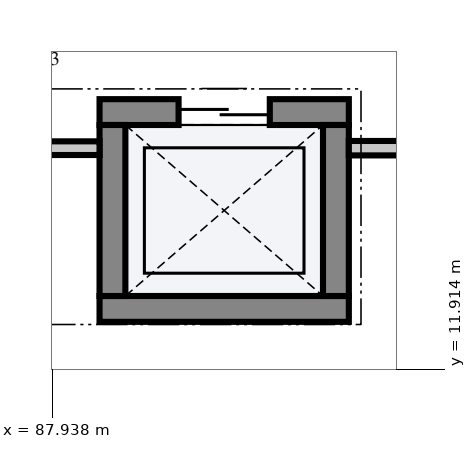
"""IFC4 building model, lengths in metres.
Left out: names, types, materials, properties, quantities, classifications, styles, units other than length and angle.
Written with IfcOpenShell. Run it as: python <this file> out.ifc"""

import sys

from ifc_helpers import new_model, si_unit, direction, frame, frame_2d, origin, place, context, subcontext, project, spatial, rectangle, extrude, element, fill, save


model = new_model("IFC4")
c1 = context("Model", 3, precision=1e-05, world=origin(), true_north=direction((0.0, 1.0)))
c2 = subcontext(c1, "Body", "Model", "MODEL_VIEW")
j1 = project(units=[si_unit("LENGTHUNIT", "METRE"), si_unit("PLANEANGLEUNIT", "RADIAN")], contexts=[c1])
p1 = place(None, origin())
s1 = spatial("IfcSite", under=j1, at=p1, CompositionType="ELEMENT")
p2 = place(p1, origin())
s2 = spatial("IfcBuilding", under=s1, at=p2, CompositionType="ELEMENT")
p3 = place(p2, frame((0.0, 0.0, 15.0)))
s3 = spatial("IfcBuildingStorey", under=s2, at=p3, CompositionType="ELEMENT", Elevation=15.0)
p4 = place(p3, frame((88.56, 12.705, 0.0), z_axis=(0.0, 0.0, 1.0), x_axis=(1.0, 0.0, 0.0)))
e1 = element("IfcWall", 1, at=p4, inside=s3, PredefinedType="SHEAR", context=c2, shape_type="SweptSolid", body=[
    extrude(rectangle(XDim=3.28, YDim=0.34, at=frame_2d((1.64, 0.0))), origin(), (0.0, 0.0, 1.0), 4.52),
])
p5 = place(p3, frame((88.56, 15.295, 0.0), z_axis=(0.0, 0.0, 1.0), x_axis=(1.0, 0.0, 0.0)))
e2 = element("IfcWall", 2, at=p5, inside=s3, PredefinedType="SHEAR", context=c2, shape_type="SweptSolid", body=[
    extrude(rectangle(XDim=3.28, YDim=0.34, at=frame_2d((1.64, 0.0))), origin(), (0.0, 0.0, 1.0), 4.52),
])
p6 = place(p5, frame((1.04, 0.0, 0.0)))
e3 = element("IfcOpeningElement", 3, at=p6, cuts=e2, PredefinedType="OPENING", context=c2, shape_type="SweptSolid", body=[
    extrude(rectangle(XDim=1.2, YDim=2.2, at=frame_2d((0.6, 1.1))), frame((0.0, 0.182, 0.0), z_axis=(0.0, -1.0, 0.0), x_axis=(1.0, 0.0, 0.0)), (0.0, 0.0, 1.0), 0.364),
])
for number, where, z_axis, x_axis in (
    (4, (88.73, 12.875, 0.0), (0.0, 0.0, 1.0), (0.0, 1.0, 0.0)),
    (5, (91.67, 12.875, 0.0), (0.0, 0.0, 1.0), (0.0, 1.0, 0.0)),
):
    element("IfcWall", number, at=place(p3, frame(where, z_axis=z_axis, x_axis=x_axis)), inside=s3, PredefinedType="SHEAR", context=c2, shape_type="SweptSolid", body=[
        extrude(rectangle(XDim=2.25, YDim=0.34, at=frame_2d((1.125, 0.0))), origin(), (0.0, 0.0, 1.0), 4.52),
    ])
p7 = place(p3, frame((91.84, 14.82, 0.0), z_axis=(0.0, 0.0, 1.0), x_axis=(1.0, 0.0, 0.0)))
e6 = element("IfcWall", 6, at=p7, inside=s3, PredefinedType="PARTITIONING", context=c2, shape_type="SweptSolid", body=[
    extrude(rectangle(XDim=24.04, YDim=0.19, at=frame_2d((12.02, 0.0))), origin(), (0.0, 0.0, 1.0), 4.52),
])
p8 = place(p7, frame((11.678, 0.0, 0.0)))
e7 = element("IfcOpeningElement", 7, at=p8, cuts=e6, PredefinedType="OPENING", context=c2, shape_type="SweptSolid", body=[
    extrude(rectangle(XDim=1.15, YDim=2.2, at=frame_2d((0.575, 1.1))), frame((0.0, 0.107, 0.0), z_axis=(0.0, -1.0, 0.0), x_axis=(1.0, 0.0, 0.0)), (0.0, 0.0, 1.0), 0.214),
])
p9 = place(p3, frame((84.44, 14.82, 0.0), z_axis=(0.0, 0.0, 1.0), x_axis=(1.0, 0.0, 0.0)))
e8 = element("IfcWall", 8, at=p9, inside=s3, PredefinedType="PARTITIONING", context=c2, shape_type="SweptSolid", body=[
    extrude(rectangle(XDim=4.12, YDim=0.18, at=frame_2d((2.06, 0.0))), origin(), (0.0, 0.0, 1.0), 4.52),
])
p10 = place(p6, origin())
e9 = element("IfcDoor", 9, at=p10, inside=s3, OperationType="DOUBLE_DOOR_SLIDING", PredefinedType="DOOR", context=c2, shape_type="SweptSolid", body=[
    extrude(rectangle(XDim=1.2, YDim=2.2, at=frame_2d((0.6, 1.1))), frame((0.0, 0.025, 0.0), z_axis=(0.0, -1.0, 0.0), x_axis=(1.0, 0.0, 0.0)), (0.0, 0.0, 1.0), 0.05),
])
fill(e3, e9)
save(model, sys.argv[1])
